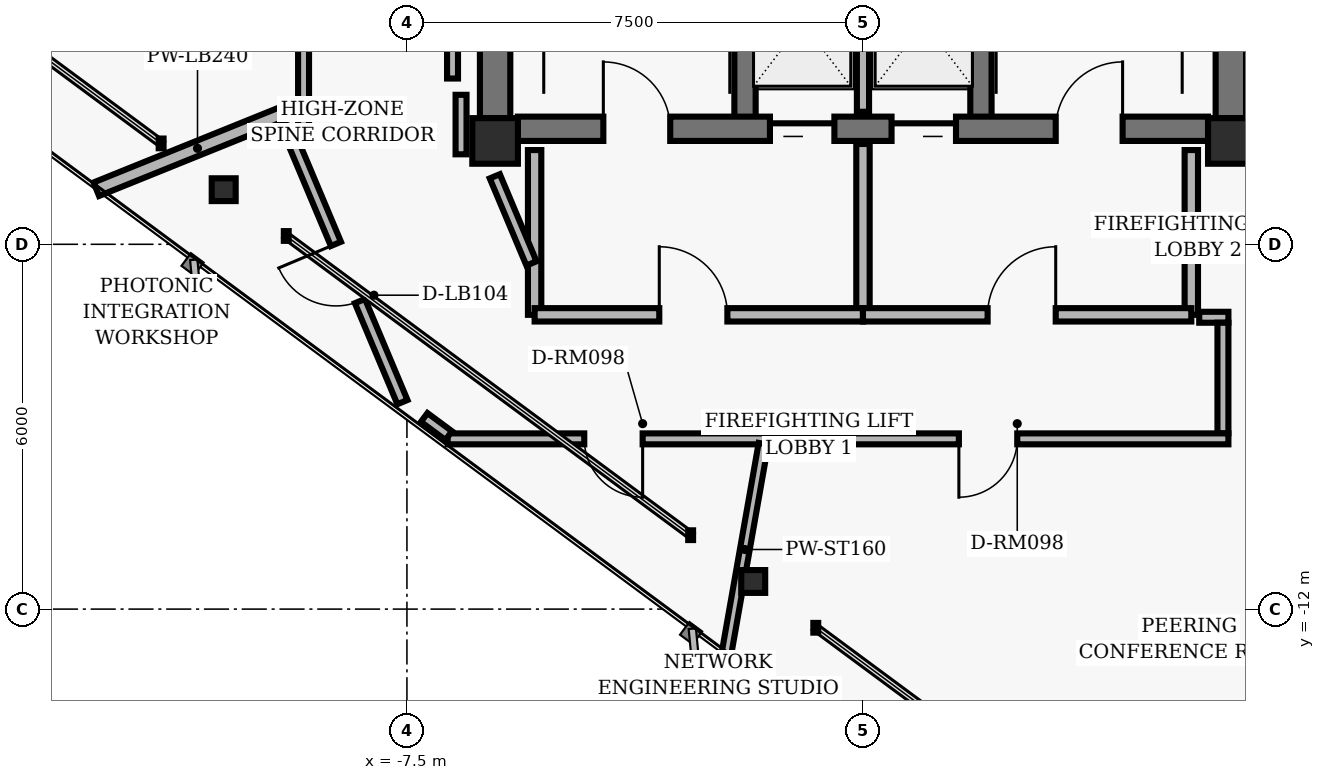
"""IFC4 building model, lengths in metres.
Left out: names, types, materials, properties, quantities, classifications, styles, units other than length and angle.
Written with IfcOpenShell. Run it as: python <this file> out.ifc"""

import sys

from ifc_helpers import new_model, si_unit, direction, frame, frame_2d, origin, origin_2d, place, context, subcontext, project, spatial, rectangle, hollow_rectangle, i_section, extrude, element, fill, save


model = new_model("IFC4")
c1 = context("Model", 3, precision=1e-05, world=origin(), true_north=direction((0.0, 1.0)))
c2 = subcontext(c1, "Body", "Model", "MODEL_VIEW")
j1 = project(units=[si_unit("LENGTHUNIT", "METRE"), si_unit("PLANEANGLEUNIT", "RADIAN")], contexts=[c1])
p1 = place(None, origin())
s1 = spatial("IfcSite", under=j1, at=p1, CompositionType="ELEMENT")
p2 = place(p1, origin())
s2 = spatial("IfcBuilding", under=s1, at=p2, CompositionType="ELEMENT")
p3 = place(p2, frame((0.0, 0.0, 220.96)))
s3 = spatial("IfcBuildingStorey", under=s2, at=p3, CompositionType="ELEMENT", Elevation=220.96)
for number, where, z_axis, x_axis in (
    (1, (-6.05, -4.3, 0.0), (0.0, 0.0, 1.0), (1.0, 0.0, 0.0)),
    (2, (6.05, -4.3, 0.0), (0.0, 0.0, 1.0), (1.0, 0.0, 0.0)),
):
    element("IfcColumn", number, at=place(p3, frame(where, z_axis=z_axis, x_axis=x_axis)), inside=s3, PredefinedType="COLUMN", context=c2, shape_type="SweptSolid", body=[
        extrude(hollow_rectangle(XDim=0.75, YDim=0.75, WallThickness=0.05, InnerFilletRadius=0.02, OuterFilletRadius=0.04, at=origin_2d()), origin(), (0.0, 0.0, 1.0), 3.04),
    ])
for number, where, z_axis, x_axis in (
    (3, (-6.05, -3.925, 0.0), (0.0, 0.0, 1.0), (0.0, 1.0, 0.0)),
    (4, (6.05, -3.925, 0.0), (0.0, 0.0, 1.0), (0.0, 1.0, 0.0)),
):
    element("IfcWall", number, at=place(p3, frame(where, z_axis=z_axis, x_axis=x_axis)), inside=s3, PredefinedType="SHEAR", context=c2, shape_type="SweptSolid", body=[
        extrude(rectangle(XDim=3.55, YDim=0.5, at=frame_2d((1.775, 0.0))), origin(), (0.0, 0.0, 1.0), 2.798),
    ])
for number, where, z_axis, x_axis in (
    (5, (-1.94, -4.1, 0.0), (0.0, 0.0, 1.0), (0.0, 1.0, 0.0)),
    (6, (1.94, -4.1, 0.0), (0.0, 0.0, 1.0), (0.0, 1.0, 0.0)),
):
    element("IfcWall", number, at=place(p3, frame(where, z_axis=z_axis, x_axis=x_axis)), inside=s3, PredefinedType="SHEAR", context=c2, shape_type="SweptSolid", body=[
        extrude(rectangle(XDim=8.2, YDim=0.35, at=frame_2d((4.1, 0.0))), origin(), (0.0, 0.0, 1.0), 2.798),
    ])
p4 = place(p3, frame((-5.675, -4.1, 0.0), z_axis=(0.0, 0.0, 1.0), x_axis=(1.0, 0.0, 0.0)))
e7 = element("IfcWall", 7, at=p4, inside=s3, PredefinedType="SHEAR", context=c2, shape_type="SweptSolid", body=[
    extrude(rectangle(XDim=11.35, YDim=0.4, at=frame_2d((5.675, 0.0))), origin(), (0.0, 0.0, 1.0), 2.798),
])
p5 = place(p4, frame((1.405, 0.0, 0.0)))
e8 = element("IfcOpeningElement", 8, at=p5, cuts=e7, PredefinedType="OPENING", context=c2, shape_type="SweptSolid", body=[
    extrude(rectangle(XDim=1.1, YDim=2.04, at=frame_2d((0.55, 1.02))), frame((0.0, 0.21, 0.0), z_axis=(0.0, -1.0, 0.0), x_axis=(1.0, 0.0, 0.0)), (0.0, 0.0, 1.0), 0.42),
])
p6 = place(p4, frame((8.845, 0.0, 0.0)))
e9 = element("IfcOpeningElement", 9, at=p6, cuts=e7, PredefinedType="OPENING", context=c2, shape_type="SweptSolid", body=[
    extrude(rectangle(XDim=1.1, YDim=2.04, at=frame_2d((0.55, 1.02))), frame((0.0, 0.21, 0.0), z_axis=(0.0, -1.0, 0.0), x_axis=(1.0, 0.0, 0.0)), (0.0, 0.0, 1.0), 0.42),
])
p7 = place(p4, frame((4.145, 0.0, 0.0)))
e10 = element("IfcOpeningElement", 10, at=p7, cuts=e7, PredefinedType="OPENING", context=c2, shape_type="SweptSolid", body=[
    extrude(rectangle(XDim=1.06, YDim=2.04, at=frame_2d((0.53, 1.02))), frame((0.0, 0.21, 0.0), z_axis=(0.0, -1.0, 0.0), x_axis=(1.0, 0.0, 0.0)), (0.0, 0.0, 1.0), 0.42),
])
p8 = place(p4, frame((6.145, 0.0, 0.0)))
e11 = element("IfcOpeningElement", 11, at=p8, cuts=e7, PredefinedType="OPENING", context=c2, shape_type="SweptSolid", body=[
    extrude(rectangle(XDim=1.06, YDim=2.04, at=frame_2d((0.53, 1.02))), frame((0.0, 0.21, 0.0), z_axis=(0.0, -1.0, 0.0), x_axis=(1.0, 0.0, 0.0)), (0.0, 0.0, 1.0), 0.42),
])
for number, where, z_axis, x_axis in (
    (12, (-10.513, -5.102, 0.0), (0.0, 0.0, 1.0), (1.0, 0.0, 0.0)),
    (13, (-1.805, -11.546, 0.0), (0.0, 0.0, 1.0), (1.0, 0.0, 0.0)),
):
    element("IfcColumn", number, at=place(p3, frame(where, z_axis=z_axis, x_axis=x_axis)), inside=s3, PredefinedType="COLUMN", context=c2, shape_type="SweptSolid", body=[
        extrude(i_section(OverallWidth=0.394, OverallDepth=0.375, WebThickness=0.017, FlangeThickness=0.028, FilletRadius=0.016, at=origin_2d()), origin(), (0.0, 0.0, 1.0), 3.04),
    ])
p9 = place(p3, frame((0.0, -3.82, 0.0), z_axis=(0.0, 0.0, 1.0), x_axis=(0.0, 1.0, 0.0)))
e14 = element("IfcWall", 14, at=p9, inside=s3, PredefinedType="PARTITIONING", context=c2, shape_type="SweptSolid", body=[
    extrude(rectangle(XDim=2.67, YDim=0.2, at=frame_2d((1.335, 0.0))), origin(), (0.0, 0.0, 1.0), 2.773),
])
for number, where, z_axis, x_axis in (
    (15, (-5.4, -7.16, 0.0), (0.0, 0.0, 1.0), (0.0, 1.0, 0.0)),
    (16, (5.4, -7.16, 0.0), (0.0, 0.0, 1.0), (0.0, 1.0, 0.0)),
):
    element("IfcWall", number, at=place(p3, frame(where, z_axis=z_axis, x_axis=x_axis)), inside=s3, PredefinedType="PARTITIONING", context=c2, shape_type="SweptSolid", body=[
        extrude(rectangle(XDim=2.71, YDim=0.22, at=frame_2d((1.355, 0.0))), origin(), (0.0, 0.0, 1.0), 2.773),
    ])
p10 = place(p3, frame((0.0, -7.16, 0.0), z_axis=(0.0, 0.0, 1.0), x_axis=(0.0, 1.0, 0.0)))
e17 = element("IfcWall", 17, at=p10, inside=s3, PredefinedType="PARTITIONING", context=c2, shape_type="SweptSolid", body=[
    extrude(rectangle(XDim=2.81, YDim=0.22, at=frame_2d((1.405, 0.0))), origin(), (0.0, 0.0, 1.0), 2.773),
])
p11 = place(p3, frame((-5.4, -7.16, 0.0), z_axis=(0.0, 0.0, 1.0), x_axis=(1.0, 0.0, 0.0)))
e18 = element("IfcWall", 18, at=p11, inside=s3, PredefinedType="PARTITIONING", context=c2, shape_type="SweptSolid", body=[
    extrude(rectangle(XDim=5.4, YDim=0.22, at=frame_2d((2.7, 0.0))), origin(), (0.0, 0.0, 1.0), 2.395),
])
p12 = place(p11, frame((2.05, 0.0, 0.0)))
e19 = element("IfcOpeningElement", 19, at=p12, cuts=e18, PredefinedType="OPENING", context=c2, shape_type="SweptSolid", body=[
    extrude(rectangle(XDim=1.12, YDim=2.02, at=frame_2d((0.56, 1.01))), frame((0.0, 0.12, 0.0), z_axis=(0.0, -1.0, 0.0), x_axis=(1.0, 0.0, 0.0)), (0.0, 0.0, 1.0), 0.24),
])
p13 = place(p3, frame((0.0, -7.16, 0.0), z_axis=(0.0, 0.0, 1.0), x_axis=(1.0, 0.0, 0.0)))
e20 = element("IfcWall", 20, at=p13, inside=s3, PredefinedType="PARTITIONING", context=c2, shape_type="SweptSolid", body=[
    extrude(rectangle(XDim=5.4, YDim=0.22, at=frame_2d((2.7, 0.0))), origin(), (0.0, 0.0, 1.0), 2.773),
])
p14 = place(p13, frame((2.05, 0.0, 0.0)))
e21 = element("IfcOpeningElement", 21, at=p14, cuts=e20, PredefinedType="OPENING", context=c2, shape_type="SweptSolid", body=[
    extrude(rectangle(XDim=1.12, YDim=2.02, at=frame_2d((0.56, 1.01))), frame((0.0, 0.12, 0.0), z_axis=(0.0, -1.0, 0.0), x_axis=(1.0, 0.0, 0.0)), (0.0, 0.0, 1.0), 0.24),
])
p15 = place(p3, frame((-7.574, -8.596, 0.0), z_axis=(0.0, 0.0, 1.0), x_axis=(-0.38757793583, 0.921836939842, 0.0)))
e22 = element("IfcWall", 22, at=p15, inside=s3, PredefinedType="PARTITIONING", context=c2, shape_type="SweptSolid", body=[
    extrude(rectangle(XDim=4.625, YDim=0.18, at=frame_2d((2.313, 0.0))), origin(), (0.0, 0.0, 1.0), 2.773),
])
p16 = place(p15, frame((1.803, 0.0, 0.0)))
e23 = element("IfcOpeningElement", 23, at=p16, cuts=e22, PredefinedType="OPENING", context=c2, shape_type="SweptSolid", body=[
    extrude(rectangle(XDim=1.02, YDim=2.02, at=frame_2d((0.51, 1.01))), frame((0.0, 0.1, 0.0), z_axis=(0.0, -1.0, 0.0), x_axis=(1.0, 0.0, 0.0)), (0.0, 0.0, 1.0), 0.2),
])
p17 = place(p3, frame((-9.2, -4.303, 0.0), z_axis=(0.0, 0.0, 1.0), x_axis=(0.0, 1.0, 0.0)))
e24 = element("IfcWall", 24, at=p17, inside=s3, PredefinedType="PARTITIONING", context=c2, shape_type="SweptSolid", body=[
    extrude(rectangle(XDim=8.607, YDim=0.18, at=frame_2d((4.303, 0.0))), origin(), (0.0, 0.0, 1.0), 2.773),
])
p18 = place(p17, frame((2.767, 0.0, 0.0)))
e25 = element("IfcOpeningElement", 25, at=p18, cuts=e24, PredefinedType="OPENING", context=c2, shape_type="SweptSolid", body=[
    extrude(rectangle(XDim=0.96, YDim=2.02, at=frame_2d((0.48, 1.01))), frame((0.0, 0.1, 0.0), z_axis=(0.0, -1.0, 0.0), x_axis=(1.0, 0.0, 0.0)), (0.0, 0.0, 1.0), 0.2),
])
p19 = place(p3, frame((-6.75, 3.273, 0.0), z_axis=(0.0, 0.0, 1.0), x_axis=(0.0, -1.0, 0.0)))
e26 = element("IfcWall", 26, at=p19, inside=s3, PredefinedType="PARTITIONING", context=c2, shape_type="SweptSolid", body=[
    extrude(rectangle(XDim=6.547, YDim=0.18, at=frame_2d((3.273, 0.0))), origin(), (0.0, 0.0, 1.0), 2.773),
])
p20 = place(p3, frame((-6.61, -3.541, 0.0), z_axis=(0.0, 0.0, 1.0), x_axis=(0.0, -1.0, 0.0)))
e27 = element("IfcWall", 27, at=p20, inside=s3, PredefinedType="PARTITIONING", context=c2, shape_type="SweptSolid", body=[
    extrude(rectangle(XDim=0.979, YDim=0.18, at=frame_2d((0.489, 0.0))), origin(), (0.0, 0.0, 1.0), 2.773),
])
p21 = place(p3, frame((-6.055, -4.882, 0.0), z_axis=(0.0, 0.0, 1.0), x_axis=(0.387579540458, -0.921836265189, 0.0)))
e28 = element("IfcWall", 28, at=p21, inside=s3, PredefinedType="PARTITIONING", context=c2, shape_type="SweptSolid", body=[
    extrude(rectangle(XDim=1.555, YDim=0.18, at=frame_2d((0.777, 0.0))), origin(), (0.0, 0.0, 1.0), 2.253),
])
p22 = place(p3, frame((5.53, -7.2, 0.0), z_axis=(0.0, 0.0, 1.0), x_axis=(1.0, 0.0, 0.0)))
e29 = element("IfcWall", 29, at=p22, inside=s3, PredefinedType="PARTITIONING", context=c2, shape_type="SweptSolid", body=[
    extrude(rectangle(XDim=0.48, YDim=0.18, at=frame_2d((0.24, 0.0))), origin(), (0.0, 0.0, 1.0), 2.773),
])
p23 = place(p3, frame((5.92, -7.29, 0.0), z_axis=(0.0, 0.0, 1.0), x_axis=(0.0, -1.0, 0.0)))
e30 = element("IfcWall", 30, at=p23, inside=s3, PredefinedType="PARTITIONING", context=c2, shape_type="SweptSolid", body=[
    extrude(rectangle(XDim=1.82, YDim=0.18, at=frame_2d((0.91, 0.0))), origin(), (0.0, 0.0, 1.0), 2.253),
])
p24 = place(p3, frame((6.01, -9.2, 0.0), z_axis=(0.0, 0.0, 1.0), x_axis=(-1.0, 0.0, 0.0)))
e31 = element("IfcWall", 31, at=p24, inside=s3, PredefinedType="PARTITIONING", context=c2, shape_type="SweptSolid", body=[
    extrude(rectangle(XDim=12.84, YDim=0.18, at=frame_2d((6.42, 0.0))), origin(), (0.0, 0.0, 1.0), 2.773),
])
p25 = place(p24, frame((9.634, 0.0, 0.0)))
e32 = element("IfcOpeningElement", 32, at=p25, cuts=e31, PredefinedType="OPENING", context=c2, shape_type="SweptSolid", body=[
    extrude(rectangle(XDim=0.96, YDim=2.02, at=frame_2d((0.48, 1.01))), frame((0.0, 0.1, 0.0), z_axis=(0.0, -1.0, 0.0), x_axis=(1.0, 0.0, 0.0)), (0.0, 0.0, 1.0), 0.2),
])
p26 = place(p24, frame((3.473, 0.0, 0.0)))
e33 = element("IfcOpeningElement", 33, at=p26, cuts=e31, PredefinedType="OPENING", context=c2, shape_type="SweptSolid", body=[
    extrude(rectangle(XDim=0.96, YDim=2.02, at=frame_2d((0.48, 1.01))), frame((0.0, 0.1, 0.0), z_axis=(0.0, -1.0, 0.0), x_axis=(1.0, 0.0, 0.0)), (0.0, 0.0, 1.0), 0.2),
])
p27 = place(p3, frame((-6.812, -9.146, 0.0), z_axis=(0.0, 0.0, 1.0), x_axis=(-0.803893055119, 0.594773869577, 0.0)))
e34 = element("IfcWall", 34, at=p27, inside=s3, PredefinedType="PARTITIONING", context=c2, shape_type="SweptSolid", body=[
    extrude(rectangle(XDim=0.502, YDim=0.18, at=frame_2d((0.251, 0.0))), origin(), (0.0, 0.0, 1.0), 2.773),
])
p28 = place(p3, frame((-9.28, -3.75, 0.0), z_axis=(0.0, 0.0, 1.0), x_axis=(-0.927209590074, -0.374542889499, 0.0)))
e35 = element("IfcWall", 35, at=p28, inside=s3, PredefinedType="PARTITIONING", context=c2, shape_type="SweptSolid", body=[
    extrude(rectangle(XDim=3.59, YDim=0.24, at=frame_2d((1.795, 0.0))), origin(), (0.0, 0.0, 1.0), 2.773),
])
p29 = place(p3, frame((-1.636, -9.28, 0.0), z_axis=(0.0, 0.0, 1.0), x_axis=(-0.17367100135, -0.984803728308, 0.0)))
e36 = element("IfcWall", 36, at=p29, inside=s3, PredefinedType="PARTITIONING", context=c2, shape_type="SweptSolid", body=[
    extrude(rectangle(XDim=3.533, YDim=0.16, at=frame_2d((1.766, 0.0))), origin(), (0.0, 0.0, 1.0), 2.773),
])
p30 = place(p5, origin())
e37 = element("IfcDoor", 37, at=p30, inside=s3, OperationType="SINGLE_SWING_LEFT", PredefinedType="DOOR", context=c2, shape_type="SweptSolid", body=[
    extrude(rectangle(XDim=1.1, YDim=2.04, at=frame_2d((0.55, 1.02))), frame((0.0, 0.025, 0.0), z_axis=(0.0, -1.0, 0.0), x_axis=(1.0, 0.0, 0.0)), (0.0, 0.0, 1.0), 0.05),
])
fill(e8, e37)
p31 = place(p6, origin())
e38 = element("IfcDoor", 38, at=p31, inside=s3, OperationType="SINGLE_SWING_RIGHT", PredefinedType="DOOR", context=c2, shape_type="SweptSolid", body=[
    extrude(rectangle(XDim=1.1, YDim=2.04, at=frame_2d((0.55, 1.02))), frame((0.0, 0.025, 0.0), z_axis=(0.0, -1.0, 0.0), x_axis=(1.0, 0.0, 0.0)), (0.0, 0.0, 1.0), 0.05),
])
fill(e9, e38)
p32 = place(p7, origin())
e39 = element("IfcDoor", 39, at=p32, inside=s3, OperationType="SLIDING_TO_LEFT", PredefinedType="DOOR", context=c2, shape_type="SweptSolid", body=[
    extrude(rectangle(XDim=1.06, YDim=2.04, at=frame_2d((0.53, 1.02))), frame((0.0, 0.025, 0.0), z_axis=(0.0, -1.0, 0.0), x_axis=(1.0, 0.0, 0.0)), (0.0, 0.0, 1.0), 0.05),
])
fill(e10, e39)
p33 = place(p8, origin())
e40 = element("IfcDoor", 40, at=p33, inside=s3, OperationType="SLIDING_TO_RIGHT", PredefinedType="DOOR", context=c2, shape_type="SweptSolid", body=[
    extrude(rectangle(XDim=1.06, YDim=2.04, at=frame_2d((0.53, 1.02))), frame((0.0, 0.025, 0.0), z_axis=(0.0, -1.0, 0.0), x_axis=(1.0, 0.0, 0.0)), (0.0, 0.0, 1.0), 0.05),
])
fill(e11, e40)
p34 = place(p12, origin())
e41 = element("IfcDoor", 41, at=p34, inside=s3, OperationType="SINGLE_SWING_LEFT", PredefinedType="DOOR", context=c2, shape_type="SweptSolid", body=[
    extrude(rectangle(XDim=1.12, YDim=2.02, at=frame_2d((0.56, 1.01))), frame((0.0, 0.025, 0.0), z_axis=(0.0, -1.0, 0.0), x_axis=(1.0, 0.0, 0.0)), (0.0, 0.0, 1.0), 0.05),
])
fill(e19, e41)
p35 = place(p14, origin())
e42 = element("IfcDoor", 42, at=p35, inside=s3, OperationType="SINGLE_SWING_RIGHT", PredefinedType="DOOR", context=c2, shape_type="SweptSolid", body=[
    extrude(rectangle(XDim=1.12, YDim=2.02, at=frame_2d((0.56, 1.01))), frame((0.0, 0.025, 0.0), z_axis=(0.0, -1.0, 0.0), x_axis=(1.0, 0.0, 0.0)), (0.0, 0.0, 1.0), 0.05),
])
fill(e21, e42)
p36 = place(p16, origin())
e43 = element("IfcDoor", 43, at=p36, inside=s3, OperationType="SINGLE_SWING_RIGHT", PredefinedType="DOOR", context=c2, shape_type="SweptSolid", body=[
    extrude(rectangle(XDim=1.02, YDim=2.02, at=frame_2d((0.51, 1.01))), frame((0.0, 0.025, 0.0), z_axis=(0.0, -1.0, 0.0), x_axis=(1.0, 0.0, 0.0)), (0.0, 0.0, 1.0), 0.05),
])
fill(e23, e43)
p37 = place(p25, origin())
e44 = element("IfcDoor", 44, at=p37, inside=s3, OperationType="SINGLE_SWING_LEFT", PredefinedType="DOOR", context=c2, shape_type="SweptSolid", body=[
    extrude(rectangle(XDim=0.96, YDim=2.02, at=frame_2d((0.48, 1.01))), frame((0.0, 0.025, 0.0), z_axis=(0.0, -1.0, 0.0), x_axis=(1.0, 0.0, 0.0)), (0.0, 0.0, 1.0), 0.05),
])
fill(e32, e44)
p38 = place(p26, origin())
e45 = element("IfcDoor", 45, at=p38, inside=s3, OperationType="SINGLE_SWING_RIGHT", PredefinedType="DOOR", context=c2, shape_type="SweptSolid", body=[
    extrude(rectangle(XDim=0.96, YDim=2.02, at=frame_2d((0.48, 1.01))), frame((0.0, 0.025, 0.0), z_axis=(0.0, -1.0, 0.0), x_axis=(1.0, 0.0, 0.0)), (0.0, 0.0, 1.0), 0.05),
])
fill(e33, e45)
save(model, sys.argv[1])
